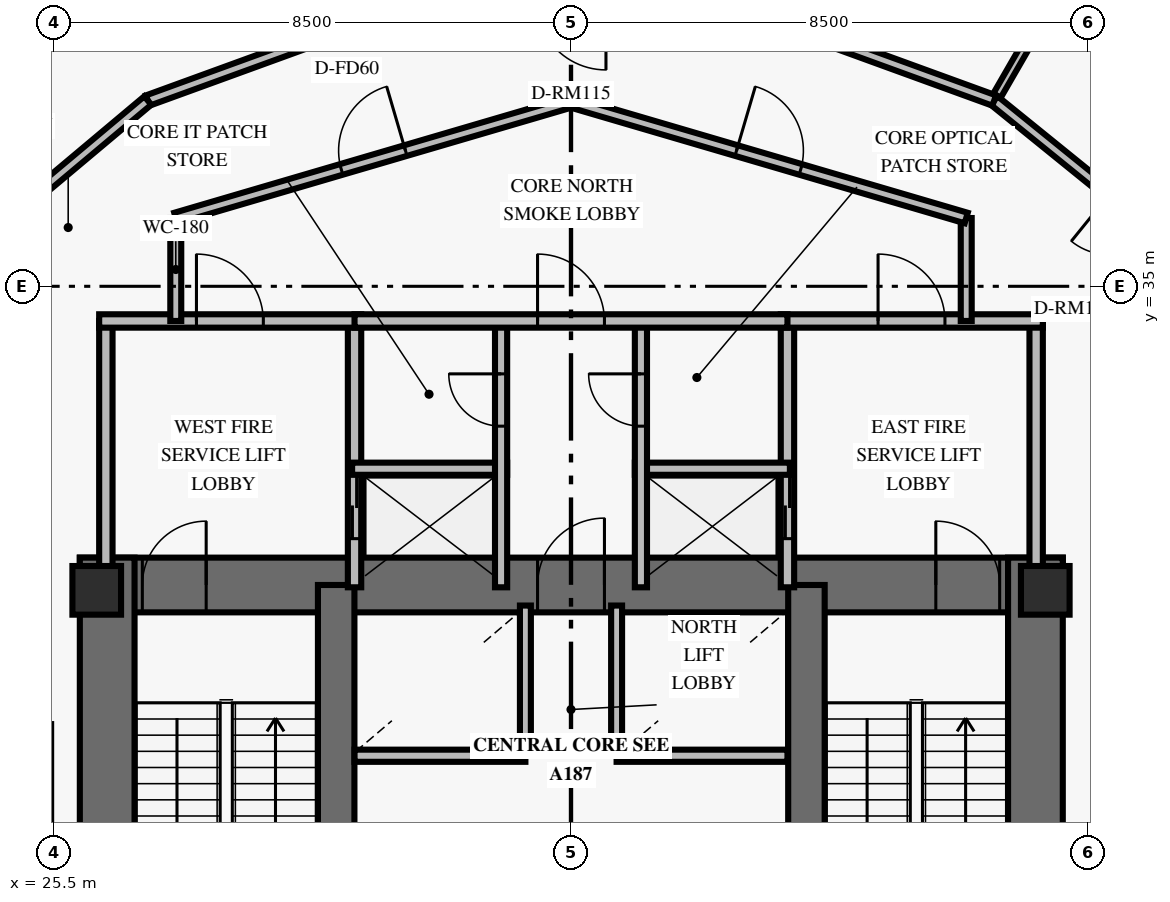
"""IFC4 building model, lengths in metres.
Left out: names, types, materials, properties, quantities, classifications, styles, units other than length and angle.
Written with IfcOpenShell. Run it as: python <this file> out.ifc"""

import sys

from ifc_helpers import new_model, si_unit, direction, frame, frame_2d, origin, origin_2d, place, context, subcontext, project, spatial, rectangle, extrude, element, fill, save


model = new_model("IFC4")
c1 = context("Model", 3, precision=1e-05, world=origin(), true_north=direction((0.0, 1.0)))
c2 = subcontext(c1, "Body", "Model", "MODEL_VIEW")
j1 = project(units=[si_unit("LENGTHUNIT", "METRE"), si_unit("PLANEANGLEUNIT", "RADIAN")], contexts=[c1])
p1 = place(None, origin())
s1 = spatial("IfcSite", under=j1, at=p1, CompositionType="ELEMENT")
p2 = place(p1, origin())
s2 = spatial("IfcBuilding", under=s1, at=p2, CompositionType="ELEMENT")
p3 = place(p2, frame((0.0, 0.0, 30.0)))
s3 = spatial("IfcBuildingStorey", under=s2, at=p3, CompositionType="ELEMENT", Elevation=30.0)
p4 = place(p3, frame((25.922, 30.088, 0.0), z_axis=(0.0, 0.0, 1.0), x_axis=(1.0, 0.0, 0.0)))
e1 = element("IfcWall", 1, at=p4, inside=s3, PredefinedType="SHEAR", context=c2, shape_type="SweptSolid", body=[
    extrude(rectangle(XDim=16.166, YDim=0.9, at=frame_2d((8.083, 0.0))), origin(), (0.0, 0.0, 1.0), 4.2),
])
p5 = place(p4, frame((1.028, 0.0, 0.0)))
e2 = element("IfcOpeningElement", 2, at=p5, cuts=e1, PredefinedType="OPENING", context=c2, shape_type="SweptSolid", body=[
    extrude(rectangle(XDim=1.05, YDim=2.15, at=frame_2d((0.525, 1.075))), frame((0.0, 0.46, 0.0), z_axis=(0.0, -1.0, 0.0), x_axis=(1.0, 0.0, 0.0)), (0.0, 0.0, 1.0), 0.92),
])
p6 = place(p4, frame((14.078, 0.0, 0.0)))
e3 = element("IfcOpeningElement", 3, at=p6, cuts=e1, PredefinedType="OPENING", context=c2, shape_type="SweptSolid", body=[
    extrude(rectangle(XDim=1.05, YDim=2.15, at=frame_2d((0.525, 1.075))), frame((0.0, 0.46, 0.0), z_axis=(0.0, -1.0, 0.0), x_axis=(1.0, 0.0, 0.0)), (0.0, 0.0, 1.0), 0.92),
])
p7 = place(p4, frame((7.528, 0.0, 0.0)))
e4 = element("IfcOpeningElement", 4, at=p7, cuts=e1, PredefinedType="OPENING", context=c2, shape_type="SweptSolid", body=[
    extrude(rectangle(XDim=1.1, YDim=2.15, at=frame_2d((0.55, 1.075))), frame((0.0, 0.46, 0.0), z_axis=(0.0, -1.0, 0.0), x_axis=(1.0, 0.0, 0.0)), (0.0, 0.0, 1.0), 0.92),
])
for number, where, z_axis, x_axis in (
    (5, (26.372, 19.662, 0.0), (0.0, 0.0, 1.0), (0.0, 1.0, 0.0)),
    (6, (41.638, 19.662, 0.0), (0.0, 0.0, 1.0), (0.0, 1.0, 0.0)),
):
    element("IfcWall", number, at=place(p3, frame(where, z_axis=z_axis, x_axis=x_axis)), inside=s3, PredefinedType="SHEAR", context=c2, shape_type="SweptSolid", body=[
        extrude(rectangle(XDim=10.876, YDim=0.9, at=frame_2d((5.438, 0.0))), origin(), (0.0, 0.0, 1.0), 4.2),
    ])
for number, where, z_axis, x_axis in (
    (7, (30.138, 20.112, 0.0), (0.0, 0.0, 1.0), (0.0, 1.0, 0.0)),
    (8, (37.872, 20.112, 0.0), (0.0, 0.0, 1.0), (0.0, 1.0, 0.0)),
):
    element("IfcWall", number, at=place(p3, frame(where, z_axis=z_axis, x_axis=x_axis)), inside=s3, PredefinedType="SHEAR", context=c2, shape_type="SweptSolid", body=[
        extrude(rectangle(XDim=9.976, YDim=0.6, at=frame_2d((4.988, 0.0))), origin(), (0.0, 0.0, 1.0), 4.2),
    ])
for number, where, z_axis, x_axis in (
    (9, (26.2, 30.0, 0.0), (0.0, 0.0, 1.0), (1.0, 0.0, 0.0)),
    (10, (41.8, 30.0, 0.0), (0.0, 0.0, 1.0), (1.0, 0.0, 0.0)),
):
    element("IfcColumn", number, at=place(p3, frame(where, z_axis=z_axis, x_axis=x_axis)), inside=s3, PredefinedType="PILASTER", context=c2, shape_type="SweptSolid", body=[
        extrude(rectangle(XDim=0.8, YDim=0.8, at=origin_2d()), origin(), (0.0, 0.0, 1.0), 4.2),
    ])
p8 = place(p3, frame((26.35, 30.05, 0.0), z_axis=(0.0, 0.0, 1.0), x_axis=(0.0, 1.0, 0.0)))
e11 = element("IfcWall", 11, at=p8, inside=s3, PredefinedType="SOLIDWALL", context=c2, shape_type="SweptSolid", body=[
    extrude(rectangle(XDim=4.38, YDim=0.22, at=frame_2d((2.19, 0.0))), origin(), (0.0, 0.0, 1.0), 2.67),
])
p9 = place(p3, frame((30.44, 30.05, 0.0), z_axis=(0.0, 0.0, 1.0), x_axis=(0.0, 1.0, 0.0)))
e12 = element("IfcWall", 12, at=p9, inside=s3, PredefinedType="SOLIDWALL", context=c2, shape_type="SweptSolid", body=[
    extrude(rectangle(XDim=4.38, YDim=0.22, at=frame_2d((2.19, 0.0))), origin(), (0.0, 0.0, 1.0), 2.67),
])
p10 = place(p9, frame((0.8, 0.0, 0.0)))
e13 = element("IfcOpeningElement", 13, at=p10, cuts=e12, PredefinedType="OPENING", context=c2, shape_type="SweptSolid", body=[
    extrude(rectangle(XDim=1.05, YDim=2.1, at=frame_2d((0.525, 1.05))), frame((0.0, 0.12, 0.0), z_axis=(0.0, -1.0, 0.0), x_axis=(1.0, 0.0, 0.0)), (0.0, 0.0, 1.0), 0.24),
])
p11 = place(p3, frame((26.24, 34.43, 0.0), z_axis=(0.0, 0.0, 1.0), x_axis=(1.0, 0.0, 0.0)))
e14 = element("IfcWall", 14, at=p11, inside=s3, PredefinedType="SOLIDWALL", context=c2, shape_type="SweptSolid", body=[
    extrude(rectangle(XDim=4.31, YDim=0.22, at=frame_2d((2.155, 0.0))), origin(), (0.0, 0.0, 1.0), 2.67),
])
p12 = place(p11, frame((1.6, 0.0, 0.0)))
e15 = element("IfcOpeningElement", 15, at=p12, cuts=e14, PredefinedType="OPENING", context=c2, shape_type="SweptSolid", body=[
    extrude(rectangle(XDim=1.1, YDim=2.15, at=frame_2d((0.55, 1.075))), frame((0.0, 0.12, 0.0), z_axis=(0.0, -1.0, 0.0), x_axis=(1.0, 0.0, 0.0)), (0.0, 0.0, 1.0), 0.24),
])
p13 = place(p3, frame((30.4, 32.0, 0.0), z_axis=(0.0, 0.0, 1.0), x_axis=(1.0, 0.0, 0.0)))
e16 = element("IfcWall", 16, at=p13, inside=s3, PredefinedType="SOLIDWALL", context=c2, shape_type="SweptSolid", body=[
    extrude(rectangle(XDim=2.55, YDim=0.2, at=frame_2d((1.275, 0.0))), origin(), (0.0, 0.0, 1.0), 2.67),
])
p14 = place(p3, frame((32.85, 30.05, 0.0), z_axis=(0.0, 0.0, 1.0), x_axis=(0.0, 1.0, 0.0)))
e17 = element("IfcWall", 17, at=p14, inside=s3, PredefinedType="SOLIDWALL", context=c2, shape_type="SweptSolid", body=[
    extrude(rectangle(XDim=4.38, YDim=0.2, at=frame_2d((2.19, 0.0))), origin(), (0.0, 0.0, 1.0), 2.67),
])
p15 = place(p14, frame((2.65, 0.0, 0.0)))
e18 = element("IfcOpeningElement", 18, at=p15, cuts=e17, PredefinedType="OPENING", context=c2, shape_type="SweptSolid", body=[
    extrude(rectangle(XDim=0.86, YDim=2.05, at=frame_2d((0.43, 1.025))), frame((0.0, 0.11, 0.0), z_axis=(0.0, -1.0, 0.0), x_axis=(1.0, 0.0, 0.0)), (0.0, 0.0, 1.0), 0.22),
])
p16 = place(p3, frame((37.56, 30.05, 0.0), z_axis=(0.0, 0.0, 1.0), x_axis=(0.0, 1.0, 0.0)))
e19 = element("IfcWall", 19, at=p16, inside=s3, PredefinedType="SOLIDWALL", context=c2, shape_type="SweptSolid", body=[
    extrude(rectangle(XDim=4.38, YDim=0.22, at=frame_2d((2.19, 0.0))), origin(), (0.0, 0.0, 1.0), 2.67),
])
p17 = place(p16, frame((0.8, 0.0, 0.0)))
e20 = element("IfcOpeningElement", 20, at=p17, cuts=e19, PredefinedType="OPENING", context=c2, shape_type="SweptSolid", body=[
    extrude(rectangle(XDim=1.05, YDim=2.1, at=frame_2d((0.525, 1.05))), frame((0.0, 0.12, 0.0), z_axis=(0.0, -1.0, 0.0), x_axis=(1.0, 0.0, 0.0)), (0.0, 0.0, 1.0), 0.24),
])
p18 = place(p3, frame((41.65, 30.05, 0.0), z_axis=(0.0, 0.0, 1.0), x_axis=(0.0, 1.0, 0.0)))
e21 = element("IfcWall", 21, at=p18, inside=s3, PredefinedType="SOLIDWALL", context=c2, shape_type="SweptSolid", body=[
    extrude(rectangle(XDim=4.38, YDim=0.22, at=frame_2d((2.19, 0.0))), origin(), (0.0, 0.0, 1.0), 2.67),
])
p19 = place(p3, frame((37.45, 34.43, 0.0), z_axis=(0.0, 0.0, 1.0), x_axis=(1.0, 0.0, 0.0)))
e22 = element("IfcWall", 22, at=p19, inside=s3, PredefinedType="SOLIDWALL", context=c2, shape_type="SweptSolid", body=[
    extrude(rectangle(XDim=4.31, YDim=0.22, at=frame_2d((2.155, 0.0))), origin(), (0.0, 0.0, 1.0), 2.67),
])
p20 = place(p19, frame((1.6, 0.0, 0.0)))
e23 = element("IfcOpeningElement", 23, at=p20, cuts=e22, PredefinedType="OPENING", context=c2, shape_type="SweptSolid", body=[
    extrude(rectangle(XDim=1.1, YDim=2.15, at=frame_2d((0.55, 1.075))), frame((0.0, 0.12, 0.0), z_axis=(0.0, -1.0, 0.0), x_axis=(1.0, 0.0, 0.0)), (0.0, 0.0, 1.0), 0.24),
])
p21 = place(p3, frame((35.05, 32.0, 0.0), z_axis=(0.0, 0.0, 1.0), x_axis=(1.0, 0.0, 0.0)))
e24 = element("IfcWall", 24, at=p21, inside=s3, PredefinedType="SOLIDWALL", context=c2, shape_type="SweptSolid", body=[
    extrude(rectangle(XDim=2.55, YDim=0.2, at=frame_2d((1.275, 0.0))), origin(), (0.0, 0.0, 1.0), 2.67),
])
p22 = place(p3, frame((35.15, 30.05, 0.0), z_axis=(0.0, 0.0, 1.0), x_axis=(0.0, 1.0, 0.0)))
e25 = element("IfcWall", 25, at=p22, inside=s3, PredefinedType="SOLIDWALL", context=c2, shape_type="SweptSolid", body=[
    extrude(rectangle(XDim=4.38, YDim=0.2, at=frame_2d((2.19, 0.0))), origin(), (0.0, 0.0, 1.0), 2.67),
])
p23 = place(p22, frame((2.65, 0.0, 0.0)))
e26 = element("IfcOpeningElement", 26, at=p23, cuts=e25, PredefinedType="OPENING", context=c2, shape_type="SweptSolid", body=[
    extrude(rectangle(XDim=0.86, YDim=2.05, at=frame_2d((0.43, 1.025))), frame((0.0, 0.11, 0.0), z_axis=(0.0, -1.0, 0.0), x_axis=(1.0, 0.0, 0.0)), (0.0, 0.0, 1.0), 0.22),
])
p24 = place(p3, frame((30.44, 34.43, 0.0), z_axis=(0.0, 0.0, 1.0), x_axis=(1.0, 0.0, 0.0)))
e27 = element("IfcWall", 27, at=p24, inside=s3, PredefinedType="SOLIDWALL", context=c2, shape_type="SweptSolid", body=[
    extrude(rectangle(XDim=7.12, YDim=0.22, at=frame_2d((3.56, 0.0))), origin(), (0.0, 0.0, 1.0), 2.67),
])
p25 = place(p24, frame((3.01, 0.0, 0.0)))
e28 = element("IfcOpeningElement", 28, at=p25, cuts=e27, PredefinedType="OPENING", context=c2, shape_type="SweptSolid", body=[
    extrude(rectangle(XDim=1.1, YDim=2.15, at=frame_2d((0.55, 1.075))), frame((0.0, 0.12, 0.0), z_axis=(0.0, -1.0, 0.0), x_axis=(1.0, 0.0, 0.0)), (0.0, 0.0, 1.0), 0.24),
])
p26 = place(p3, frame((30.44, 27.28, 0.0), z_axis=(0.0, 0.0, 1.0), x_axis=(1.0, 0.0, 0.0)))
e29 = element("IfcWall", 29, at=p26, inside=s3, PredefinedType="SOLIDWALL", context=c2, shape_type="SweptSolid", body=[
    extrude(rectangle(XDim=2.81, YDim=0.2, at=frame_2d((1.405, 0.0))), origin(), (0.0, 0.0, 1.0), 2.67),
])
p27 = place(p3, frame((33.25, 27.28, 0.0), z_axis=(0.0, 0.0, 1.0), x_axis=(0.0, 1.0, 0.0)))
e30 = element("IfcWall", 30, at=p27, inside=s3, PredefinedType="SOLIDWALL", context=c2, shape_type="SweptSolid", body=[
    extrude(rectangle(XDim=2.47, YDim=0.18, at=frame_2d((1.235, 0.0))), origin(), (0.0, 0.0, 1.0), 2.67),
])
p28 = place(p3, frame((34.75, 27.28, 0.0), z_axis=(0.0, 0.0, 1.0), x_axis=(1.0, 0.0, 0.0)))
e31 = element("IfcWall", 31, at=p28, inside=s3, PredefinedType="SOLIDWALL", context=c2, shape_type="SweptSolid", body=[
    extrude(rectangle(XDim=2.81, YDim=0.2, at=frame_2d((1.405, 0.0))), origin(), (0.0, 0.0, 1.0), 2.67),
])
p29 = place(p3, frame((34.75, 27.28, 0.0), z_axis=(0.0, 0.0, 1.0), x_axis=(0.0, 1.0, 0.0)))
e32 = element("IfcWall", 32, at=p29, inside=s3, PredefinedType="SOLIDWALL", context=c2, shape_type="SweptSolid", body=[
    extrude(rectangle(XDim=2.47, YDim=0.18, at=frame_2d((1.235, 0.0))), origin(), (0.0, 0.0, 1.0), 2.67),
])
for number, where, z_axis, x_axis in (
    (33, (27.5, 34.43, 0.0), (0.0, 0.0, 1.0), (0.0, 1.0, 0.0)),
    (34, (40.5, 36.123, 0.0), (0.0, 0.0, 1.0), (0.0, -1.0, 0.0)),
):
    element("IfcWall", number, at=place(p3, frame(where, z_axis=z_axis, x_axis=x_axis)), inside=s3, PredefinedType="PARTITIONING", context=c2, shape_type="SweptSolid", body=[
        extrude(rectangle(XDim=1.693, YDim=0.18, at=frame_2d((0.846, 0.0))), origin(), (0.0, 0.0, 1.0), 2.67),
    ])
p30 = place(p3, frame((27.5, 36.123, 0.0), z_axis=(0.0, 0.0, 1.0), x_axis=(0.959546654541, 0.281549671923, 0.0)))
e35 = element("IfcWall", 35, at=p30, inside=s3, PredefinedType="PARTITIONING", context=c2, shape_type="SweptSolid", body=[
    extrude(rectangle(XDim=6.774, YDim=0.18, at=frame_2d((3.387, 0.0))), origin(), (0.0, 0.0, 1.0), 2.67),
])
p31 = place(p30, frame((2.837, 0.0, 0.0)))
e36 = element("IfcOpeningElement", 36, at=p31, cuts=e35, PredefinedType="OPENING", context=c2, shape_type="SweptSolid", body=[
    extrude(rectangle(XDim=1.1, YDim=2.15, at=frame_2d((0.55, 1.075))), frame((0.0, 0.1, 0.0), z_axis=(0.0, -1.0, 0.0), x_axis=(1.0, 0.0, 0.0)), (0.0, 0.0, 1.0), 0.2),
])
p32 = place(p3, frame((34.0, 38.03, 0.0), z_axis=(0.0, 0.0, 1.0), x_axis=(0.959546654541, -0.281549671923, 0.0)))
e37 = element("IfcWall", 37, at=p32, inside=s3, PredefinedType="PARTITIONING", context=c2, shape_type="SweptSolid", body=[
    extrude(rectangle(XDim=6.774, YDim=0.18, at=frame_2d((3.387, 0.0))), origin(), (0.0, 0.0, 1.0), 2.67),
])
p33 = place(p32, frame((2.837, 0.0, 0.0)))
e38 = element("IfcOpeningElement", 38, at=p33, cuts=e37, PredefinedType="OPENING", context=c2, shape_type="SweptSolid", body=[
    extrude(rectangle(XDim=1.1, YDim=2.15, at=frame_2d((0.55, 1.075))), frame((0.0, 0.1, 0.0), z_axis=(0.0, -1.0, 0.0), x_axis=(1.0, 0.0, 0.0)), (0.0, 0.0, 1.0), 0.2),
])
p34 = place(p3, frame((40.96, 38.055, 0.0), z_axis=(0.0, 0.0, 1.0), x_axis=(0.500007596729, 0.866021017767, 0.0)))
e39 = element("IfcWall", 39, at=p34, inside=s3, PredefinedType="PARTITIONING", context=c2, shape_type="SweptSolid", body=[
    extrude(rectangle(XDim=8.573, YDim=0.14, at=frame_2d((4.286, 0.0))), origin(), (0.0, 0.0, 1.0), 2.67),
])
p35 = place(p3, frame((44.344, 35.314, 0.0), z_axis=(0.0, 0.0, 1.0), x_axis=(-0.777119533123, 0.629353025923, 0.0)))
e40 = element("IfcWall", 40, at=p35, inside=s3, PredefinedType="PARTITIONING", context=c2, shape_type="SweptSolid", body=[
    extrude(rectangle(XDim=4.355, YDim=0.18, at=frame_2d((2.178, 0.0))), origin(), (0.0, 0.0, 1.0), 2.67),
])
p36 = place(p35, frame((0.914, 0.0, 0.0)))
e41 = element("IfcOpeningElement", 41, at=p36, cuts=e40, PredefinedType="OPENING", context=c2, shape_type="SweptSolid", body=[
    extrude(rectangle(XDim=1.0, YDim=2.15, at=frame_2d((0.5, 1.075))), frame((0.0, 0.1, 0.0), z_axis=(0.0, -1.0, 0.0), x_axis=(1.0, 0.0, 0.0)), (0.0, 0.0, 1.0), 0.2),
])
for number, where, z_axis, x_axis in (
    (42, (40.96, 38.055, 0.0), (0.0, 0.0, 1.0), (-0.94, 0.342, 0.0)),
    (43, (31.583, 39.708, 0.0), (0.0, 0.0, 1.0), (-0.94, -0.342, 0.0)),
):
    element("IfcWall", number, at=place(p3, frame(where, z_axis=z_axis, x_axis=x_axis)), inside=s3, PredefinedType="PARTITIONING", context=c2, shape_type="SweptSolid", body=[
        extrude(rectangle(XDim=4.834, YDim=0.18, at=frame_2d((2.417, 0.0))), origin(), (0.0, 0.0, 1.0), 2.67),
    ])
p37 = place(p3, frame((27.04, 38.055, 0.0), z_axis=(0.0, 0.0, 1.0), x_axis=(-0.766027093856, -0.642808285167, 0.0)))
e44 = element("IfcWall", 44, at=p37, inside=s3, PredefinedType="PARTITIONING", context=c2, shape_type="SweptSolid", body=[
    extrude(rectangle(XDim=4.834, YDim=0.18, at=frame_2d((2.417, 0.0))), origin(), (0.0, 0.0, 1.0), 2.67),
])
p38 = place(p5, origin())
e45 = element("IfcDoor", 45, at=p38, inside=s3, OperationType="SINGLE_SWING_RIGHT", PredefinedType="DOOR", context=c2, shape_type="SweptSolid", body=[
    extrude(rectangle(XDim=1.05, YDim=2.15, at=frame_2d((0.525, 1.075))), frame((0.0, 0.025, 0.0), z_axis=(0.0, -1.0, 0.0), x_axis=(1.0, 0.0, 0.0)), (0.0, 0.0, 1.0), 0.05),
])
fill(e2, e45)
p39 = place(p6, origin())
e46 = element("IfcDoor", 46, at=p39, inside=s3, OperationType="SINGLE_SWING_LEFT", PredefinedType="DOOR", context=c2, shape_type="SweptSolid", body=[
    extrude(rectangle(XDim=1.05, YDim=2.15, at=frame_2d((0.525, 1.075))), frame((0.0, 0.025, 0.0), z_axis=(0.0, -1.0, 0.0), x_axis=(1.0, 0.0, 0.0)), (0.0, 0.0, 1.0), 0.05),
])
fill(e3, e46)
p40 = place(p7, origin())
e47 = element("IfcDoor", 47, at=p40, inside=s3, OperationType="SINGLE_SWING_RIGHT", PredefinedType="DOOR", context=c2, shape_type="SweptSolid", body=[
    extrude(rectangle(XDim=1.1, YDim=2.15, at=frame_2d((0.55, 1.075))), frame((0.0, 0.025, 0.0), z_axis=(0.0, -1.0, 0.0), x_axis=(1.0, 0.0, 0.0)), (0.0, 0.0, 1.0), 0.05),
])
fill(e4, e47)
p41 = place(p12, origin())
e48 = element("IfcDoor", 48, at=p41, inside=s3, OperationType="SINGLE_SWING_LEFT", PredefinedType="DOOR", context=c2, shape_type="SweptSolid", body=[
    extrude(rectangle(XDim=1.1, YDim=2.15, at=frame_2d((0.55, 1.075))), frame((0.0, 0.025, 0.0), z_axis=(0.0, -1.0, 0.0), x_axis=(1.0, 0.0, 0.0)), (0.0, 0.0, 1.0), 0.05),
])
fill(e15, e48)
p42 = place(p10, origin())
e49 = element("IfcDoor", 49, at=p42, inside=s3, OperationType="DOUBLE_DOOR_SLIDING", PredefinedType="USERDEFINED", context=c2, shape_type="SweptSolid", body=[
    extrude(rectangle(XDim=1.05, YDim=2.1, at=frame_2d((0.525, 1.05))), frame((0.0, 0.025, 0.0), z_axis=(0.0, -1.0, 0.0), x_axis=(1.0, 0.0, 0.0)), (0.0, 0.0, 1.0), 0.05),
])
fill(e13, e49)
p43 = place(p15, origin())
e50 = element("IfcDoor", 50, at=p43, inside=s3, OperationType="SINGLE_SWING_RIGHT", PredefinedType="TRAPDOOR", context=c2, shape_type="SweptSolid", body=[
    extrude(rectangle(XDim=0.86, YDim=2.05, at=frame_2d((0.43, 1.025))), frame((0.0, 0.025, 0.0), z_axis=(0.0, -1.0, 0.0), x_axis=(1.0, 0.0, 0.0)), (0.0, 0.0, 1.0), 0.05),
])
fill(e18, e50)
p44 = place(p20, origin())
e51 = element("IfcDoor", 51, at=p44, inside=s3, OperationType="SINGLE_SWING_LEFT", PredefinedType="DOOR", context=c2, shape_type="SweptSolid", body=[
    extrude(rectangle(XDim=1.1, YDim=2.15, at=frame_2d((0.55, 1.075))), frame((0.0, 0.025, 0.0), z_axis=(0.0, -1.0, 0.0), x_axis=(1.0, 0.0, 0.0)), (0.0, 0.0, 1.0), 0.05),
])
fill(e23, e51)
p45 = place(p17, origin())
e52 = element("IfcDoor", 52, at=p45, inside=s3, OperationType="DOUBLE_DOOR_SLIDING", PredefinedType="USERDEFINED", context=c2, shape_type="SweptSolid", body=[
    extrude(rectangle(XDim=1.05, YDim=2.1, at=frame_2d((0.525, 1.05))), frame((0.0, 0.025, 0.0), z_axis=(0.0, -1.0, 0.0), x_axis=(1.0, 0.0, 0.0)), (0.0, 0.0, 1.0), 0.05),
])
fill(e20, e52)
p46 = place(p23, origin())
e53 = element("IfcDoor", 53, at=p46, inside=s3, OperationType="SINGLE_SWING_RIGHT", PredefinedType="TRAPDOOR", context=c2, shape_type="SweptSolid", body=[
    extrude(rectangle(XDim=0.86, YDim=2.05, at=frame_2d((0.43, 1.025))), frame((0.0, 0.025, 0.0), z_axis=(0.0, -1.0, 0.0), x_axis=(1.0, 0.0, 0.0)), (0.0, 0.0, 1.0), 0.05),
])
fill(e26, e53)
p47 = place(p25, origin())
e54 = element("IfcDoor", 54, at=p47, inside=s3, OperationType="SINGLE_SWING_LEFT", PredefinedType="DOOR", context=c2, shape_type="SweptSolid", body=[
    extrude(rectangle(XDim=1.1, YDim=2.15, at=frame_2d((0.55, 1.075))), frame((0.0, 0.025, 0.0), z_axis=(0.0, -1.0, 0.0), x_axis=(1.0, 0.0, 0.0)), (0.0, 0.0, 1.0), 0.05),
])
fill(e28, e54)
p48 = place(p31, origin())
e55 = element("IfcDoor", 55, at=p48, inside=s3, OperationType="SINGLE_SWING_RIGHT", PredefinedType="DOOR", context=c2, shape_type="SweptSolid", body=[
    extrude(rectangle(XDim=1.1, YDim=2.15, at=frame_2d((0.55, 1.075))), frame((0.0, 0.025, 0.0), z_axis=(0.0, -1.0, 0.0), x_axis=(1.0, 0.0, 0.0)), (0.0, 0.0, 1.0), 0.05),
])
fill(e36, e55)
p49 = place(p33, origin())
e56 = element("IfcDoor", 56, at=p49, inside=s3, OperationType="SINGLE_SWING_LEFT", PredefinedType="DOOR", context=c2, shape_type="SweptSolid", body=[
    extrude(rectangle(XDim=1.1, YDim=2.15, at=frame_2d((0.55, 1.075))), frame((0.0, 0.025, 0.0), z_axis=(0.0, -1.0, 0.0), x_axis=(1.0, 0.0, 0.0)), (0.0, 0.0, 1.0), 0.05),
])
fill(e38, e56)
save(model, sys.argv[1])
